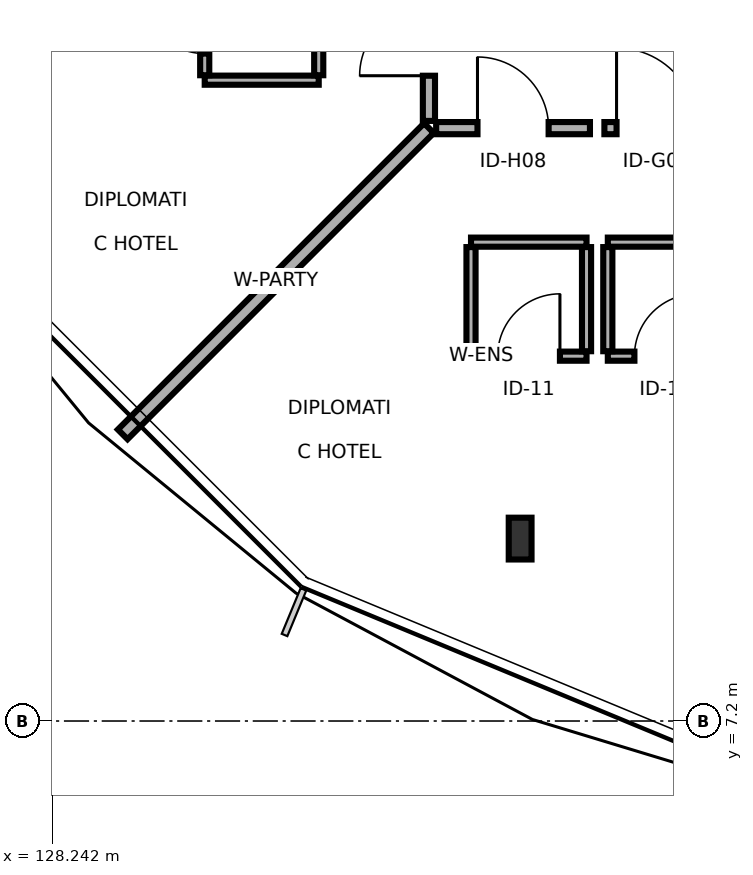
"""IFC4 building model, lengths in metres.
Left out: names, types, materials, properties, quantities, classifications, styles, units other than length and angle.
Written with IfcOpenShell. Run it as: python <this file> out.ifc"""

import sys

from ifc_helpers import new_model, si_unit, direction, frame, frame_2d, origin, origin_2d, place, context, subcontext, project, spatial, rectangle, i_section, extrude, element, fill, save


model = new_model("IFC4")
c1 = context("Model", 3, precision=1e-05, world=origin(), true_north=direction((0.0, 1.0)))
c2 = subcontext(c1, "Body", "Model", "MODEL_VIEW")
j1 = project(units=[si_unit("LENGTHUNIT", "METRE"), si_unit("PLANEANGLEUNIT", "RADIAN")], contexts=[c1])
p1 = place(None, origin())
s1 = spatial("IfcSite", under=j1, at=p1, CompositionType="ELEMENT")
p2 = place(p1, origin())
s2 = spatial("IfcBuilding", under=s1, at=p2, CompositionType="ELEMENT")
p3 = place(p2, frame((0.0, 0.0, 21.5)))
s3 = spatial("IfcBuildingStorey", under=s2, at=p3, CompositionType="ELEMENT", Elevation=21.5)
p4 = place(p3, frame((134.4, 9.6, 0.0), z_axis=(0.0, 0.0, 1.0), x_axis=(1.0, 0.0, 0.0)))
e1 = element("IfcColumn", 1, at=p4, inside=s3, PredefinedType="COLUMN", context=c2, shape_type="SweptSolid", body=[
    extrude(i_section(OverallWidth=0.3, OverallDepth=0.55, WebThickness=0.015, FlangeThickness=0.029, FilletRadius=0.027, at=origin_2d()), origin(), (0.0, 0.0, 1.0), 3.4),
])
p5 = place(p3, frame((133.295, 15.0, 0.0), z_axis=(0.0, 0.0, 1.0), x_axis=(1.0, 0.0, 0.0)))
e2 = element("IfcWall", 2, at=p5, inside=s3, PredefinedType="PARTITIONING", context=c2, shape_type="SweptSolid", body=[
    extrude(rectangle(XDim=2.024, YDim=0.16, at=frame_2d((1.012, 0.0))), origin(), (0.0, 0.0, 1.0), 3.195),
])
p6 = place(p5, frame((0.544, 0.0, 0.0)))
e3 = element("IfcOpeningElement", 3, at=p6, cuts=e2, PredefinedType="OPENING", context=c2, shape_type="SweptSolid", body=[
    extrude(rectangle(XDim=0.936, YDim=2.07, at=frame_2d((0.468, 1.035))), frame((0.0, 0.09, 0.0), z_axis=(0.0, -1.0, 0.0), x_axis=(1.0, 0.0, 0.0)), (0.0, 0.0, 1.0), 0.18),
])
p7 = place(p3, frame((133.754, 12.0, 0.0), z_axis=(0.0, 0.0, 1.0), x_axis=(1.0, 0.0, 0.0)))
e4 = element("IfcWall", 4, at=p7, inside=s3, PredefinedType="PARTITIONING", context=c2, shape_type="SweptSolid", body=[
    extrude(rectangle(XDim=1.52, YDim=0.12, at=frame_2d((0.76, 0.0))), origin(), (0.0, 0.0, 1.0), 2.73),
])
p8 = place(p7, frame((0.35, 0.0, 0.0)))
e5 = element("IfcOpeningElement", 5, at=p8, cuts=e4, PredefinedType="OPENING", context=c2, shape_type="SweptSolid", body=[
    extrude(rectangle(XDim=0.82, YDim=2.08, at=frame_2d((0.41, 1.04))), frame((0.0, 0.07, 0.0), z_axis=(0.0, -1.0, 0.0), x_axis=(1.0, 0.0, 0.0)), (0.0, 0.0, 1.0), 0.14),
])
p9 = place(p3, frame((133.754, 13.5, 0.0), z_axis=(0.0, 0.0, 1.0), x_axis=(1.0, 0.0, 0.0)))
e6 = element("IfcWall", 6, at=p9, inside=s3, PredefinedType="PARTITIONING", context=c2, shape_type="SweptSolid", body=[
    extrude(rectangle(XDim=1.52, YDim=0.12, at=frame_2d((0.76, 0.0))), origin(), (0.0, 0.0, 1.0), 3.195),
])
p10 = place(p3, frame((133.754, 12.065, 0.0), z_axis=(0.0, 0.0, 1.0), x_axis=(0.0, 1.0, 0.0)))
e7 = element("IfcWall", 7, at=p10, inside=s3, PredefinedType="PARTITIONING", context=c2, shape_type="SweptSolid", body=[
    extrude(rectangle(XDim=1.37, YDim=0.12, at=frame_2d((0.685, 0.0))), origin(), (0.0, 0.0, 1.0), 3.195),
])
p11 = place(p3, frame((135.274, 12.065, 0.0), z_axis=(0.0, 0.0, 1.0), x_axis=(0.0, 1.0, 0.0)))
e8 = element("IfcWall", 8, at=p11, inside=s3, PredefinedType="PARTITIONING", context=c2, shape_type="SweptSolid", body=[
    extrude(rectangle(XDim=1.37, YDim=0.12, at=frame_2d((0.685, 0.0))), origin(), (0.0, 0.0, 1.0), 2.73),
])
p12 = place(p3, frame((133.2, 15.0, 0.0), z_axis=(0.0, 0.0, 1.0), x_axis=(-0.707106781187, -0.707106781187, 0.0)))
e9 = element("IfcWall", 9, at=p12, inside=s3, PredefinedType="PARTITIONING", context=c2, shape_type="SweptSolid", body=[
    extrude(rectangle(XDim=5.698, YDim=0.18, at=frame_2d((2.849, 0.0))), origin(), (0.0, 0.0, 1.0), 2.68),
])
p13 = place(p3, frame((135.509, 15.0, 0.0), z_axis=(0.0, 0.0, 1.0), x_axis=(1.0, 0.0, 0.0)))
e10 = element("IfcWall", 10, at=p13, inside=s3, PredefinedType="PARTITIONING", context=c2, shape_type="SweptSolid", body=[
    extrude(rectangle(XDim=2.024, YDim=0.16, at=frame_2d((1.012, 0.0))), origin(), (0.0, 0.0, 1.0), 2.73),
])
p14 = place(p13, frame((0.16, 0.0, 0.0)))
e11 = element("IfcOpeningElement", 11, at=p14, cuts=e10, PredefinedType="OPENING", context=c2, shape_type="SweptSolid", body=[
    extrude(rectangle(XDim=1.055, YDim=2.05, at=frame_2d((0.527, 1.025))), frame((0.0, 0.09, 0.0), z_axis=(0.0, -1.0, 0.0), x_axis=(1.0, 0.0, 0.0)), (0.0, 0.0, 1.0), 0.18),
])
p15 = place(p3, frame((135.554, 12.0, 0.0), z_axis=(0.0, 0.0, 1.0), x_axis=(1.0, 0.0, 0.0)))
e12 = element("IfcWall", 12, at=p15, inside=s3, PredefinedType="PARTITIONING", context=c2, shape_type="SweptSolid", body=[
    extrude(rectangle(XDim=1.52, YDim=0.12, at=frame_2d((0.76, 0.0))), origin(), (0.0, 0.0, 1.0), 3.195),
])
p16 = place(p15, frame((0.35, 0.0, 0.0)))
e13 = element("IfcOpeningElement", 13, at=p16, cuts=e12, PredefinedType="OPENING", context=c2, shape_type="SweptSolid", body=[
    extrude(rectangle(XDim=0.82, YDim=2.08, at=frame_2d((0.41, 1.04))), frame((0.0, 0.07, 0.0), z_axis=(0.0, -1.0, 0.0), x_axis=(1.0, 0.0, 0.0)), (0.0, 0.0, 1.0), 0.14),
])
p17 = place(p3, frame((135.554, 13.5, 0.0), z_axis=(0.0, 0.0, 1.0), x_axis=(1.0, 0.0, 0.0)))
e14 = element("IfcWall", 14, at=p17, inside=s3, PredefinedType="PARTITIONING", context=c2, shape_type="SweptSolid", body=[
    extrude(rectangle(XDim=1.52, YDim=0.12, at=frame_2d((0.76, 0.0))), origin(), (0.0, 0.0, 1.0), 2.73),
])
p18 = place(p3, frame((135.554, 12.065, 0.0), z_axis=(0.0, 0.0, 1.0), x_axis=(0.0, 1.0, 0.0)))
e15 = element("IfcWall", 15, at=p18, inside=s3, PredefinedType="PARTITIONING", context=c2, shape_type="SweptSolid", body=[
    extrude(rectangle(XDim=1.37, YDim=0.12, at=frame_2d((0.685, 0.0))), origin(), (0.0, 0.0, 1.0), 2.73),
])
p19 = place(p3, frame((133.2, 15.095, 0.0), z_axis=(0.0, 0.0, 1.0), x_axis=(0.0, 1.0, 0.0)))
e16 = element("IfcWall", 16, at=p19, inside=s3, PredefinedType="PARTITIONING", context=c2, shape_type="SweptSolid", body=[
    extrude(rectangle(XDim=2.101, YDim=0.16, at=frame_2d((1.05, 0.0))), origin(), (0.0, 0.0, 1.0), 2.73),
])
p20 = place(p19, frame((0.594, 0.0, 0.0)))
e17 = element("IfcOpeningElement", 17, at=p20, cuts=e16, PredefinedType="OPENING", context=c2, shape_type="SweptSolid", body=[
    extrude(rectangle(XDim=0.912, YDim=2.13, at=frame_2d((0.456, 1.065))), frame((0.0, 0.09, 0.0), z_axis=(0.0, -1.0, 0.0), x_axis=(1.0, 0.0, 0.0)), (0.0, 0.0, 1.0), 0.18),
])
p21 = place(p3, frame((130.25, 15.631, 0.0), z_axis=(0.0, 0.0, 1.0), x_axis=(1.0, 0.0, 0.0)))
e18 = element("IfcWall", 18, at=p21, inside=s3, PredefinedType="PARTITIONING", context=c2, shape_type="SweptSolid", body=[
    extrude(rectangle(XDim=1.5, YDim=0.12, at=frame_2d((0.75, 0.0))), origin(), (0.0, 0.0, 1.0), 3.195),
])
p22 = place(p3, frame((130.25, 15.696, 0.0), z_axis=(0.0, 0.0, 1.0), x_axis=(0.0, 1.0, 0.0)))
e19 = element("IfcWall", 19, at=p22, inside=s3, PredefinedType="PARTITIONING", context=c2, shape_type="SweptSolid", body=[
    extrude(rectangle(XDim=1.39, YDim=0.12, at=frame_2d((0.695, 0.0))), origin(), (0.0, 0.0, 1.0), 2.73),
])
p23 = place(p22, frame((0.285, 0.0, 0.0)))
e20 = element("IfcOpeningElement", 20, at=p23, cuts=e19, PredefinedType="OPENING", context=c2, shape_type="SweptSolid", body=[
    extrude(rectangle(XDim=0.82, YDim=2.08, at=frame_2d((0.41, 1.04))), frame((0.0, 0.07, 0.0), z_axis=(0.0, -1.0, 0.0), x_axis=(1.0, 0.0, 0.0)), (0.0, 0.0, 1.0), 0.14),
])
p24 = place(p3, frame((131.75, 15.696, 0.0), z_axis=(0.0, 0.0, 1.0), x_axis=(0.0, 1.0, 0.0)))
e21 = element("IfcWall", 21, at=p24, inside=s3, PredefinedType="PARTITIONING", context=c2, shape_type="SweptSolid", body=[
    extrude(rectangle(XDim=1.39, YDim=0.12, at=frame_2d((0.695, 0.0))), origin(), (0.0, 0.0, 1.0), 2.73),
])
p25 = place(p6, origin())
e22 = element("IfcDoor", 22, at=p25, inside=s3, OperationType="SINGLE_SWING_LEFT", PredefinedType="DOOR", context=c2, shape_type="SweptSolid", body=[
    extrude(rectangle(XDim=0.936, YDim=2.07, at=frame_2d((0.468, 1.035))), frame((0.0, 0.025, 0.0), z_axis=(0.0, -1.0, 0.0), x_axis=(1.0, 0.0, 0.0)), (0.0, 0.0, 1.0), 0.05),
])
fill(e3, e22)
p26 = place(p8, origin())
e23 = element("IfcDoor", 23, at=p26, inside=s3, OperationType="SINGLE_SWING_RIGHT", PredefinedType="DOOR", context=c2, shape_type="SweptSolid", body=[
    extrude(rectangle(XDim=0.82, YDim=2.08, at=frame_2d((0.41, 1.04))), frame((0.0, 0.025, 0.0), z_axis=(0.0, -1.0, 0.0), x_axis=(1.0, 0.0, 0.0)), (0.0, 0.0, 1.0), 0.05),
])
fill(e5, e23)
p27 = place(p14, origin())
e24 = element("IfcDoor", 24, at=p27, inside=s3, OperationType="SINGLE_SWING_LEFT", PredefinedType="DOOR", context=c2, shape_type="SweptSolid", body=[
    extrude(rectangle(XDim=1.055, YDim=2.05, at=frame_2d((0.527, 1.025))), frame((0.0, 0.025, 0.0), z_axis=(0.0, -1.0, 0.0), x_axis=(1.0, 0.0, 0.0)), (0.0, 0.0, 1.0), 0.05),
])
fill(e11, e24)
p28 = place(p16, origin())
e25 = element("IfcDoor", 25, at=p28, inside=s3, OperationType="SINGLE_SWING_RIGHT", PredefinedType="DOOR", context=c2, shape_type="SweptSolid", body=[
    extrude(rectangle(XDim=0.82, YDim=2.08, at=frame_2d((0.41, 1.04))), frame((0.0, 0.025, 0.0), z_axis=(0.0, -1.0, 0.0), x_axis=(1.0, 0.0, 0.0)), (0.0, 0.0, 1.0), 0.05),
])
fill(e13, e25)
p29 = place(p20, origin())
e26 = element("IfcDoor", 26, at=p29, inside=s3, OperationType="SINGLE_SWING_LEFT", PredefinedType="DOOR", context=c2, shape_type="SweptSolid", body=[
    extrude(rectangle(XDim=0.912, YDim=2.13, at=frame_2d((0.456, 1.065))), frame((0.0, 0.025, 0.0), z_axis=(0.0, -1.0, 0.0), x_axis=(1.0, 0.0, 0.0)), (0.0, 0.0, 1.0), 0.05),
])
fill(e17, e26)
p30 = place(p23, origin())
e27 = element("IfcDoor", 27, at=p30, inside=s3, OperationType="SINGLE_SWING_RIGHT", PredefinedType="DOOR", context=c2, shape_type="SweptSolid", body=[
    extrude(rectangle(XDim=0.82, YDim=2.08, at=frame_2d((0.41, 1.04))), frame((0.0, 0.025, 0.0), z_axis=(0.0, -1.0, 0.0), x_axis=(1.0, 0.0, 0.0)), (0.0, 0.0, 1.0), 0.05),
])
fill(e20, e27)
save(model, sys.argv[1])
